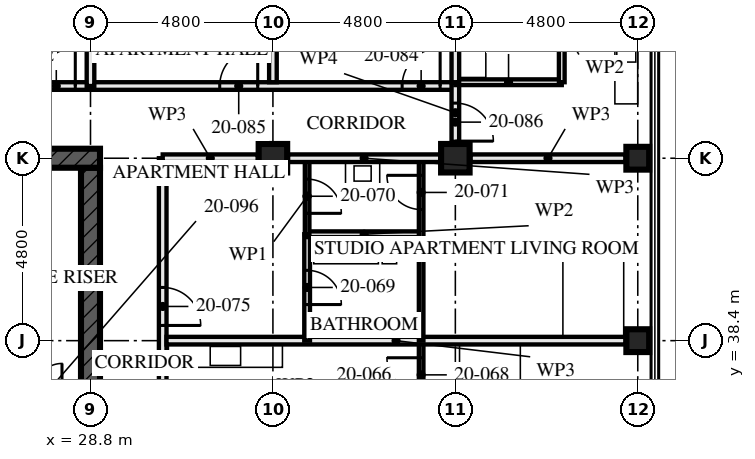
"""IFC4 building model, lengths in metres.
Left out: names, types, materials, properties, quantities, classifications, styles, units other than length and angle.
Written with IfcOpenShell. Run it as: python <this file> out.ifc"""

import sys

from ifc_helpers import new_model, si_unit, direction, frame, frame_2d, origin, origin_2d, place, context, subcontext, project, spatial, rectangle, hollow_rectangle, extrude, element, fill, save


model = new_model("IFC4")
c1 = context("Model", 3, precision=1e-05, world=origin(), true_north=direction((0.0, 1.0)))
c2 = subcontext(c1, "Body", "Model", "MODEL_VIEW")
j1 = project(units=[si_unit("LENGTHUNIT", "METRE"), si_unit("PLANEANGLEUNIT", "RADIAN")], contexts=[c1])
p1 = place(None, origin())
s1 = spatial("IfcSite", under=j1, at=p1, CompositionType="ELEMENT")
p2 = place(p1, origin())
s2 = spatial("IfcBuilding", under=s1, at=p2, CompositionType="ELEMENT")
p3 = place(p2, frame((0.0, 0.0, 76.0)))
s3 = spatial("IfcBuildingStorey", under=s2, at=p3, CompositionType="ELEMENT", Elevation=76.0)
for number, where, z_axis, x_axis in (
    (1, (33.6, 43.2, 0.0), (0.0, 0.0, 1.0), (0.0, 1.0, 0.0)),
    (2, (38.4, 43.2, 0.0), (0.0, 0.0, 1.0), (0.0, 1.0, 0.0)),
):
    element("IfcColumn", number, at=place(p3, frame(where, z_axis=z_axis, x_axis=x_axis)), inside=s3, PredefinedType="COLUMN", context=c2, shape_type="SweptSolid", body=[
        extrude(hollow_rectangle(XDim=0.75, YDim=0.75, WallThickness=0.08, at=origin_2d()), origin(), (0.0, 0.0, 1.0), 3.5),
    ])
for number, where, z_axis, x_axis in (
    (3, (43.2, 38.4, 0.0), (0.0, 0.0, 1.0), (1.0, 0.0, 0.0)),
    (4, (43.2, 43.2, 0.0), (0.0, 0.0, 1.0), (0.0, 1.0, 0.0)),
):
    element("IfcColumn", number, at=place(p3, frame(where, z_axis=z_axis, x_axis=x_axis)), inside=s3, PredefinedType="COLUMN", context=c2, shape_type="SweptSolid", body=[
        extrude(hollow_rectangle(XDim=0.6, YDim=0.6, WallThickness=0.08, at=origin_2d()), origin(), (0.0, 0.0, 1.0), 3.5),
    ])
p4 = place(p3, frame((29.05, 43.2, -0.17), z_axis=(0.0, 0.0, 1.0), x_axis=(-1.0, 0.0, 0.0)))
e5 = element("IfcWall", 5, at=p4, inside=s3, PredefinedType="SHEAR", context=c2, shape_type="SweptSolid", body=[
    extrude(rectangle(XDim=14.9, YDim=0.5, at=frame_2d((7.45, 0.0))), origin(), (0.0, 0.0, 1.0), 3.42),
])
p5 = place(p4, frame((6.85, 0.0, 0.17)))
e6 = element("IfcOpeningElement", 6, at=p5, cuts=e5, PredefinedType="OPENING", context=c2, shape_type="SweptSolid", body=[
    extrude(rectangle(XDim=1.2, YDim=2.1, at=frame_2d((0.6, 1.05))), frame((0.0, 0.26, 0.0), z_axis=(0.0, -1.0, 0.0), x_axis=(1.0, 0.0, 0.0)), (0.0, 0.0, 1.0), 0.521),
])
p6 = place(p3, frame((28.8, 29.05, -0.17), z_axis=(0.0, 0.0, 1.0), x_axis=(0.0, 1.0, 0.0)))
e7 = element("IfcWall", 7, at=p6, inside=s3, PredefinedType="SHEAR", context=c2, shape_type="SweptSolid", body=[
    extrude(rectangle(XDim=13.9, YDim=0.5, at=frame_2d((6.95, 0.0))), origin(), (0.0, 0.0, 1.0), 3.42),
])
p7 = place(p6, frame((6.35, 0.0, 0.17)))
e8 = element("IfcOpeningElement", 8, at=p7, cuts=e7, PredefinedType="OPENING", context=c2, shape_type="SweptSolid", body=[
    extrude(rectangle(XDim=1.2, YDim=2.1, at=frame_2d((0.6, 1.05))), frame((0.0, 0.26, 0.0), z_axis=(0.0, -1.0, 0.0), x_axis=(1.0, 0.0, 0.0)), (0.0, 0.0, 1.0), 0.521),
])
p8 = place(p3, frame((28.8, 45.1, 0.0), z_axis=(0.0, 0.0, 1.0), x_axis=(-1.0, 0.0, 0.0)))
e9 = element("IfcWall", 9, at=p8, inside=s3, PredefinedType="PARTITIONING", context=c2, shape_type="SweptSolid", body=[
    extrude(rectangle(XDim=14.4, YDim=0.2, at=frame_2d((7.2, 0.0))), origin(), (0.0, 0.0, 1.0), 3.25),
])
p9 = place(p8, frame((0.4, 0.0, 0.0)))
e10 = element("IfcOpeningElement", 10, at=p9, cuts=e9, PredefinedType="OPENING", context=c2, shape_type="SweptSolid", body=[
    extrude(rectangle(XDim=1.0, YDim=2.1, at=frame_2d((0.5, 1.05))), frame((0.0, 0.111, 0.0), z_axis=(0.0, -1.0, 0.0), x_axis=(1.0, 0.0, 0.0)), (0.0, 0.0, 1.0), 0.221),
])
p10 = place(p8, frame((5.2, 0.0, 0.0)))
e11 = element("IfcOpeningElement", 11, at=p10, cuts=e9, PredefinedType="OPENING", context=c2, shape_type="SweptSolid", body=[
    extrude(rectangle(XDim=1.0, YDim=2.1, at=frame_2d((0.5, 1.05))), frame((0.0, 0.111, 0.0), z_axis=(0.0, -1.0, 0.0), x_axis=(1.0, 0.0, 0.0)), (0.0, 0.0, 1.0), 0.221),
])
p11 = place(p8, frame((10.0, 0.0, 0.0)))
e12 = element("IfcOpeningElement", 12, at=p11, cuts=e9, PredefinedType="OPENING", context=c2, shape_type="SweptSolid", body=[
    extrude(rectangle(XDim=1.0, YDim=2.1, at=frame_2d((0.5, 1.05))), frame((0.0, 0.111, 0.0), z_axis=(0.0, -1.0, 0.0), x_axis=(1.0, 0.0, 0.0)), (0.0, 0.0, 1.0), 0.221),
])
p12 = place(p3, frame((37.5, 33.6, 0.0), z_axis=(0.0, 0.0, 1.0), x_axis=(0.0, 1.0, 0.0)))
e13 = element("IfcWall", 13, at=p12, inside=s3, PredefinedType="PARTITIONING", context=c2, shape_type="SweptSolid", body=[
    extrude(rectangle(XDim=4.8, YDim=0.12, at=frame_2d((2.4, 0.0))), origin(), (0.0, 0.0, 1.0), 3.25),
])
p13 = place(p12, frame((3.45, 0.0, 0.0)))
e14 = element("IfcOpeningElement", 14, at=p13, cuts=e13, PredefinedType="OPENING", context=c2, shape_type="SweptSolid", body=[
    extrude(rectangle(XDim=0.9, YDim=2.1, at=frame_2d((0.45, 1.05))), frame((0.0, 0.071, 0.0), z_axis=(0.0, -1.0, 0.0), x_axis=(1.0, 0.0, 0.0)), (0.0, 0.0, 1.0), 0.141),
])
p14 = place(p3, frame((42.88, 38.4, 0.0), z_axis=(0.0, 0.0, 1.0), x_axis=(-1.0, 0.0, 0.0)))
e15 = element("IfcWall", 15, at=p14, inside=s3, PredefinedType="PARTITIONING", context=c2, shape_type="SweptSolid", body=[
    extrude(rectangle(XDim=12.08, YDim=0.2, at=frame_2d((6.04, 0.0))), origin(), (0.0, 0.0, 1.0), 2.04),
])
p15 = place(p3, frame((37.5, 41.2, 0.0), z_axis=(0.0, 0.0, 1.0), x_axis=(-1.0, 0.0, 0.0)))
e16 = element("IfcWall", 16, at=p15, inside=s3, PredefinedType="PARTITIONING", context=c2, shape_type="SweptSolid", body=[
    extrude(rectangle(XDim=3.0, YDim=0.15, at=frame_2d((1.5, 0.0))), origin(), (0.0, 0.0, 1.0), 3.25),
])
p16 = place(p3, frame((34.5, 38.4, 0.0), z_axis=(0.0, 0.0, 1.0), x_axis=(0.0, 1.0, 0.0)))
e17 = element("IfcWall", 17, at=p16, inside=s3, PredefinedType="PARTITIONING", context=c2, shape_type="SweptSolid", body=[
    extrude(rectangle(XDim=2.8, YDim=0.15, at=frame_2d((1.4, 0.0))), origin(), (0.0, 0.0, 1.0), 3.25),
])
p17 = place(p16, frame((0.95, 0.0, 0.0)))
e18 = element("IfcOpeningElement", 18, at=p17, cuts=e17, PredefinedType="OPENING", context=c2, shape_type="SweptSolid", body=[
    extrude(rectangle(XDim=0.9, YDim=2.1, at=frame_2d((0.45, 1.05))), frame((0.0, 0.085, 0.0), z_axis=(0.0, -1.0, 0.0), x_axis=(1.0, 0.0, 0.0)), (0.0, 0.0, 1.0), 0.171),
])
p18 = place(p3, frame((34.5, 41.2, 0.0), z_axis=(0.0, 0.0, 1.0), x_axis=(0.0, 1.0, 0.0)))
e19 = element("IfcWall", 19, at=p18, inside=s3, PredefinedType="PARTITIONING", context=c2, shape_type="SweptSolid", body=[
    extrude(rectangle(XDim=2.0, YDim=0.12, at=frame_2d((1.0, 0.0))), origin(), (0.0, 0.0, 1.0), 3.25),
])
p19 = place(p18, frame((0.55, 0.0, 0.0)))
e20 = element("IfcOpeningElement", 20, at=p19, cuts=e19, PredefinedType="OPENING", context=c2, shape_type="SweptSolid", body=[
    extrude(rectangle(XDim=0.9, YDim=2.1, at=frame_2d((0.45, 1.05))), frame((0.0, 0.071, 0.0), z_axis=(0.0, -1.0, 0.0), x_axis=(1.0, 0.0, 0.0)), (0.0, 0.0, 1.0), 0.141),
])
p20 = place(p3, frame((37.5, 38.4, 0.0), z_axis=(0.0, 0.0, 1.0), x_axis=(0.0, 1.0, 0.0)))
e21 = element("IfcWall", 21, at=p20, inside=s3, PredefinedType="PARTITIONING", context=c2, shape_type="SweptSolid", body=[
    extrude(rectangle(XDim=4.8, YDim=0.12, at=frame_2d((2.4, 0.0))), origin(), (0.0, 0.0, 1.0), 3.25),
])
p21 = place(p20, frame((3.45, 0.0, 0.0)))
e22 = element("IfcOpeningElement", 22, at=p21, cuts=e21, PredefinedType="OPENING", context=c2, shape_type="SweptSolid", body=[
    extrude(rectangle(XDim=0.9, YDim=2.1, at=frame_2d((0.45, 1.05))), frame((0.0, 0.071, 0.0), z_axis=(0.0, -1.0, 0.0), x_axis=(1.0, 0.0, 0.0)), (0.0, 0.0, 1.0), 0.141),
])
p22 = place(p3, frame((30.7, 28.8, 0.0), z_axis=(0.0, 0.0, 1.0), x_axis=(0.0, 1.0, 0.0)))
e23 = element("IfcWall", 23, at=p22, inside=s3, PredefinedType="PARTITIONING", context=c2, shape_type="SweptSolid", body=[
    extrude(rectangle(XDim=14.4, YDim=0.2, at=frame_2d((7.2, 0.0))), origin(), (0.0, 0.0, 1.0), 2.04),
])
p23 = place(p22, frame((1.4, 0.0, 0.0)))
e24 = element("IfcOpeningElement", 24, at=p23, cuts=e23, PredefinedType="OPENING", context=c2, shape_type="SweptSolid", body=[
    extrude(rectangle(XDim=1.0, YDim=2.0, at=frame_2d((0.5, 1.0))), frame((0.0, 0.111, 0.0), z_axis=(0.0, -1.0, 0.0), x_axis=(1.0, 0.0, 0.0)), (0.0, 0.0, 1.0), 0.221),
])
p24 = place(p22, frame((4.1, 0.0, 0.0)))
e25 = element("IfcOpeningElement", 25, at=p24, cuts=e23, PredefinedType="OPENING", context=c2, shape_type="SweptSolid", body=[
    extrude(rectangle(XDim=1.0, YDim=2.0, at=frame_2d((0.5, 1.0))), frame((0.0, 0.111, 0.0), z_axis=(0.0, -1.0, 0.0), x_axis=(1.0, 0.0, 0.0)), (0.0, 0.0, 1.0), 0.221),
])
p25 = place(p22, frame((5.975, 0.0, 0.0)))
e26 = element("IfcOpeningElement", 26, at=p25, cuts=e23, PredefinedType="OPENING", context=c2, shape_type="SweptSolid", body=[
    extrude(rectangle(XDim=1.0, YDim=2.0, at=frame_2d((0.5, 1.0))), frame((0.0, 0.111, 0.0), z_axis=(0.0, -1.0, 0.0), x_axis=(1.0, 0.0, 0.0)), (0.0, 0.0, 1.0), 0.221),
])
p26 = place(p22, frame((10.0, 0.0, 0.0)))
e27 = element("IfcOpeningElement", 27, at=p26, cuts=e23, PredefinedType="OPENING", context=c2, shape_type="SweptSolid", body=[
    extrude(rectangle(XDim=1.0, YDim=2.0, at=frame_2d((0.5, 1.0))), frame((0.0, 0.111, 0.0), z_axis=(0.0, -1.0, 0.0), x_axis=(1.0, 0.0, 0.0)), (0.0, 0.0, 1.0), 0.221),
])
p27 = place(p3, frame((41.2, 48.2, 0.0), z_axis=(0.0, 0.0, 1.0), x_axis=(0.0, -1.0, 0.0)))
e28 = element("IfcWall", 28, at=p27, inside=s3, PredefinedType="PARTITIONING", context=c2, shape_type="SweptSolid", body=[
    extrude(rectangle(XDim=3.0, YDim=0.15, at=frame_2d((1.5, 0.0))), origin(), (0.0, 0.0, 1.0), 2.04),
])
p28 = place(p27, frame((1.05, 0.0, 0.0)))
e29 = element("IfcOpeningElement", 29, at=p28, cuts=e28, PredefinedType="OPENING", context=c2, shape_type="SweptSolid", body=[
    extrude(rectangle(XDim=0.9, YDim=2.0, at=frame_2d((0.45, 1.0))), frame((0.0, 0.085, 0.0), z_axis=(0.0, -1.0, 0.0), x_axis=(1.0, 0.0, 0.0)), (0.0, 0.0, 1.0), 0.171),
])
p29 = place(p3, frame((41.2, 45.2, 0.0), z_axis=(0.0, 0.0, 1.0), x_axis=(-1.0, 0.0, 0.0)))
e30 = element("IfcWall", 30, at=p29, inside=s3, PredefinedType="PARTITIONING", context=c2, shape_type="SweptSolid", body=[
    extrude(rectangle(XDim=2.8, YDim=0.15, at=frame_2d((1.4, 0.0))), origin(), (0.0, 0.0, 1.0), 3.25),
])
p30 = place(p3, frame((38.4, 52.48, 0.0), z_axis=(0.0, 0.0, 1.0), x_axis=(0.0, -1.0, 0.0)))
e31 = element("IfcWall", 31, at=p30, inside=s3, PredefinedType="PARTITIONING", context=c2, shape_type="SweptSolid", body=[
    extrude(rectangle(XDim=7.28, YDim=0.2, at=frame_2d((3.64, 0.0))), origin(), (0.0, 0.0, 1.0), 2.04),
])
p31 = place(p3, frame((33.6, 57.28, 0.0), z_axis=(0.0, 0.0, 1.0), x_axis=(0.0, -1.0, 0.0)))
e32 = element("IfcWall", 32, at=p31, inside=s3, PredefinedType="PARTITIONING", context=c2, shape_type="SweptSolid", body=[
    extrude(rectangle(XDim=12.08, YDim=0.2, at=frame_2d((6.04, 0.0))), origin(), (0.0, 0.0, 1.0), 2.04),
])
p32 = place(p3, frame((38.4, 45.1, 0.0), z_axis=(0.0, 0.0, 1.0), x_axis=(-1.0, 0.0, 0.0)))
e33 = element("IfcWall", 33, at=p32, inside=s3, PredefinedType="PARTITIONING", context=c2, shape_type="SweptSolid", body=[
    extrude(rectangle(XDim=9.6, YDim=0.2, at=frame_2d((4.8, 0.0))), origin(), (0.0, 0.0, 1.0), 3.25),
])
p33 = place(p32, frame((0.4, 0.0, 0.0)))
e34 = element("IfcOpeningElement", 34, at=p33, cuts=e33, PredefinedType="OPENING", context=c2, shape_type="SweptSolid", body=[
    extrude(rectangle(XDim=1.0, YDim=2.1, at=frame_2d((0.5, 1.05))), frame((0.0, 0.111, 0.0), z_axis=(0.0, -1.0, 0.0), x_axis=(1.0, 0.0, 0.0)), (0.0, 0.0, 1.0), 0.221),
])
p34 = place(p32, frame((5.2, 0.0, 0.0)))
e35 = element("IfcOpeningElement", 35, at=p34, cuts=e33, PredefinedType="OPENING", context=c2, shape_type="SweptSolid", body=[
    extrude(rectangle(XDim=1.0, YDim=2.1, at=frame_2d((0.5, 1.05))), frame((0.0, 0.111, 0.0), z_axis=(0.0, -1.0, 0.0), x_axis=(1.0, 0.0, 0.0)), (0.0, 0.0, 1.0), 0.221),
])
p35 = place(p3, frame((38.4, 45.2, 0.0), z_axis=(0.0, 0.0, 1.0), x_axis=(0.0, -1.0, 0.0)))
e36 = element("IfcWall", 36, at=p35, inside=s3, PredefinedType="PARTITIONING", context=c2, shape_type="SweptSolid", body=[
    extrude(rectangle(XDim=1.605, YDim=0.2, at=frame_2d((0.802, 0.0))), origin(), (0.0, 0.0, 1.0), 3.25),
])
p36 = place(p35, frame((0.55, 0.0, 0.0)))
e37 = element("IfcOpeningElement", 37, at=p36, cuts=e36, PredefinedType="OPENING", context=c2, shape_type="SweptSolid", body=[
    extrude(rectangle(XDim=1.0, YDim=2.1, at=frame_2d((0.5, 1.05))), frame((0.0, 0.111, 0.0), z_axis=(0.0, -1.0, 0.0), x_axis=(1.0, 0.0, 0.0)), (0.0, 0.0, 1.0), 0.221),
])
p37 = place(p3, frame((28.8, 45.1, 0.0), z_axis=(0.0, 0.0, 1.0), x_axis=(0.0, 1.0, 0.0)))
e38 = element("IfcWall", 38, at=p37, inside=s3, PredefinedType="PARTITIONING", context=c2, shape_type="SweptSolid", body=[
    extrude(rectangle(XDim=2.555, YDim=0.2, at=frame_2d((1.277, 0.0))), origin(), (0.0, 0.0, 1.0), 2.04),
])
p38 = place(p3, frame((42.88, 43.2, 0.0), z_axis=(0.0, 0.0, 1.0), x_axis=(-1.0, 0.0, 0.0)))
e39 = element("IfcWall", 39, at=p38, inside=s3, PredefinedType="PARTITIONING", context=c2, shape_type="SweptSolid", body=[
    extrude(rectangle(XDim=4.085, YDim=0.2, at=frame_2d((2.042, 0.0))), origin(), (0.0, 0.0, 1.0), 2.04),
])
p39 = place(p3, frame((38.005, 43.2, 0.0), z_axis=(0.0, 0.0, 1.0), x_axis=(-1.0, 0.0, 0.0)))
e40 = element("IfcWall", 40, at=p39, inside=s3, PredefinedType="PARTITIONING", context=c2, shape_type="SweptSolid", body=[
    extrude(rectangle(XDim=4.01, YDim=0.2, at=frame_2d((2.005, 0.0))), origin(), (0.0, 0.0, 1.0), 2.04),
])
p40 = place(p3, frame((33.205, 43.2, 0.0), z_axis=(0.0, 0.0, 1.0), x_axis=(-1.0, 0.0, 0.0)))
e41 = element("IfcWall", 41, at=p40, inside=s3, PredefinedType="PARTITIONING", context=c2, shape_type="SweptSolid", body=[
    extrude(rectangle(XDim=2.505, YDim=0.2, at=frame_2d((1.252, 0.0))), origin(), (0.0, 0.0, 1.0), 2.04),
])
p41 = place(p9, frame((1.0, 0.0, 0.0), z_axis=(0.0, 0.0, 1.0), x_axis=(-1.0, 0.0, 0.0)))
e42 = element("IfcDoor", 42, at=p41, inside=s3, OperationType="SINGLE_SWING_LEFT", PredefinedType="DOOR", context=c2, shape_type="SweptSolid", body=[
    extrude(rectangle(XDim=1.0, YDim=2.1, at=frame_2d((0.5, 1.05))), frame((0.0, 0.027, 0.0), z_axis=(0.0, -1.0, 0.0), x_axis=(1.0, 0.0, 0.0)), (0.0, 0.0, 1.0), 0.054),
])
fill(e10, e42)
p42 = place(p13, origin())
e43 = element("IfcDoor", 43, at=p42, inside=s3, OperationType="SINGLE_SWING_LEFT", PredefinedType="DOOR", context=c2, shape_type="SweptSolid", body=[
    extrude(rectangle(XDim=0.9, YDim=2.1, at=frame_2d((0.45, 1.05))), frame((0.0, 0.022, 0.0), z_axis=(0.0, -1.0, 0.0), x_axis=(1.0, 0.0, 0.0)), (0.0, 0.0, 1.0), 0.044),
])
fill(e14, e43)
p43 = place(p17, frame((0.9, 0.0, 0.0), z_axis=(0.0, 0.0, 1.0), x_axis=(-1.0, 0.0, 0.0)))
e44 = element("IfcDoor", 44, at=p43, inside=s3, OperationType="SINGLE_SWING_LEFT", PredefinedType="DOOR", context=c2, shape_type="SweptSolid", body=[
    extrude(rectangle(XDim=0.9, YDim=2.1, at=frame_2d((0.45, 1.05))), frame((0.0, 0.022, 0.0), z_axis=(0.0, -1.0, 0.0), x_axis=(1.0, 0.0, 0.0)), (0.0, 0.0, 1.0), 0.044),
])
fill(e18, e44)
p44 = place(p19, frame((0.9, 0.0, 0.0), z_axis=(0.0, 0.0, 1.0), x_axis=(-1.0, 0.0, 0.0)))
e45 = element("IfcDoor", 45, at=p44, inside=s3, OperationType="SINGLE_SWING_LEFT", PredefinedType="DOOR", context=c2, shape_type="SweptSolid", body=[
    extrude(rectangle(XDim=0.9, YDim=2.1, at=frame_2d((0.45, 1.05))), frame((0.0, 0.022, 0.0), z_axis=(0.0, -1.0, 0.0), x_axis=(1.0, 0.0, 0.0)), (0.0, 0.0, 1.0), 0.044),
])
fill(e20, e45)
p45 = place(p21, origin())
e46 = element("IfcDoor", 46, at=p45, inside=s3, OperationType="SINGLE_SWING_LEFT", PredefinedType="DOOR", context=c2, shape_type="SweptSolid", body=[
    extrude(rectangle(XDim=0.9, YDim=2.1, at=frame_2d((0.45, 1.05))), frame((0.0, 0.022, 0.0), z_axis=(0.0, -1.0, 0.0), x_axis=(1.0, 0.0, 0.0)), (0.0, 0.0, 1.0), 0.044),
])
fill(e22, e46)
p46 = place(p26, frame((1.0, 0.0, 0.0), z_axis=(0.0, 0.0, 1.0), x_axis=(-1.0, 0.0, 0.0)))
e47 = element("IfcDoor", 47, at=p46, inside=s3, OperationType="SINGLE_SWING_LEFT", PredefinedType="DOOR", context=c2, shape_type="SweptSolid", body=[
    extrude(rectangle(XDim=1.0, YDim=2.0, at=frame_2d((0.5, 1.0))), frame((0.0, 0.027, 0.0), z_axis=(0.0, -1.0, 0.0), x_axis=(1.0, 0.0, 0.0)), (0.0, 0.0, 1.0), 0.054),
])
fill(e27, e47)
p47 = place(p33, frame((1.0, 0.0, 0.0), z_axis=(0.0, 0.0, 1.0), x_axis=(-1.0, 0.0, 0.0)))
e48 = element("IfcDoor", 48, at=p47, inside=s3, OperationType="SINGLE_SWING_LEFT", PredefinedType="DOOR", context=c2, shape_type="SweptSolid", body=[
    extrude(rectangle(XDim=1.0, YDim=2.1, at=frame_2d((0.5, 1.05))), frame((0.0, 0.027, 0.0), z_axis=(0.0, -1.0, 0.0), x_axis=(1.0, 0.0, 0.0)), (0.0, 0.0, 1.0), 0.054),
])
fill(e34, e48)
p48 = place(p34, frame((1.0, 0.0, 0.0), z_axis=(0.0, 0.0, 1.0), x_axis=(-1.0, 0.0, 0.0)))
e49 = element("IfcDoor", 49, at=p48, inside=s3, OperationType="SINGLE_SWING_LEFT", PredefinedType="DOOR", context=c2, shape_type="SweptSolid", body=[
    extrude(rectangle(XDim=1.0, YDim=2.1, at=frame_2d((0.5, 1.05))), frame((0.0, 0.027, 0.0), z_axis=(0.0, -1.0, 0.0), x_axis=(1.0, 0.0, 0.0)), (0.0, 0.0, 1.0), 0.054),
])
fill(e35, e49)
p49 = place(p36, origin())
e50 = element("IfcDoor", 50, at=p49, inside=s3, OperationType="SINGLE_SWING_LEFT", PredefinedType="DOOR", context=c2, shape_type="SweptSolid", body=[
    extrude(rectangle(XDim=1.0, YDim=2.1, at=frame_2d((0.5, 1.05))), frame((0.0, 0.027, 0.0), z_axis=(0.0, -1.0, 0.0), x_axis=(1.0, 0.0, 0.0)), (0.0, 0.0, 1.0), 0.054),
])
fill(e37, e50)
save(model, sys.argv[1])
